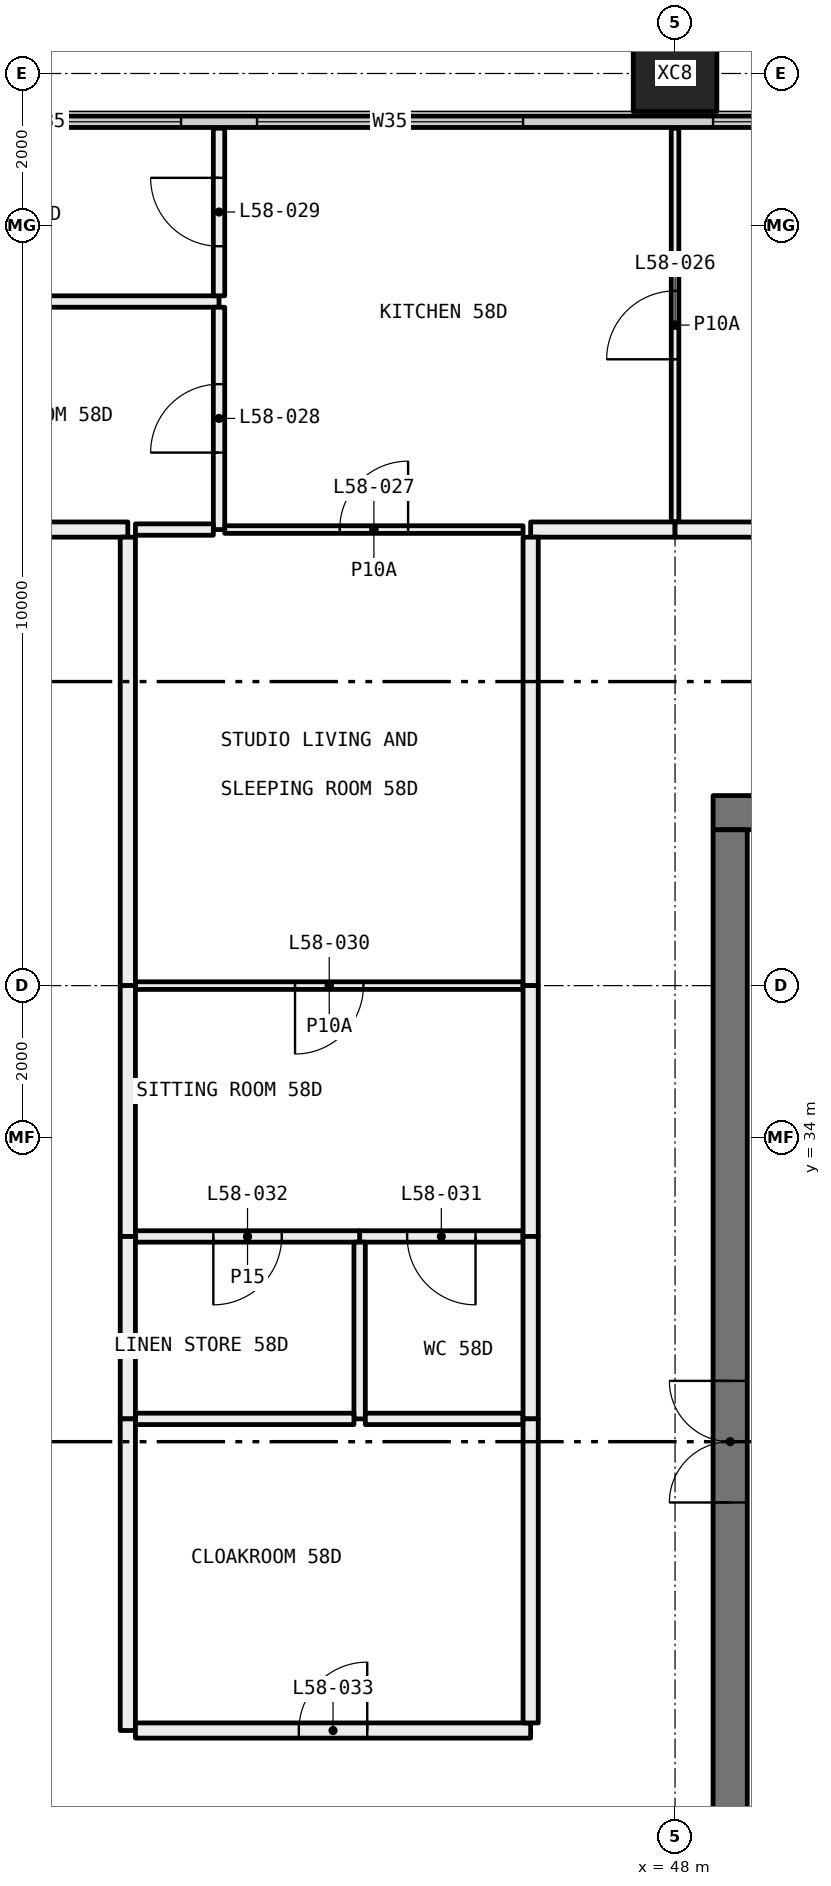
"""IFC4 building model, lengths in metres.
Left out: names, types, materials, properties, quantities, classifications, styles, units other than length and angle.
Written with IfcOpenShell. Run it as: python <this file> out.ifc"""

import sys

from ifc_helpers import new_model, si_unit, direction, frame, frame_2d, origin, origin_2d, place, context, subcontext, project, spatial, rectangle, hollow_rectangle, extrude, element, fill, save


model = new_model("IFC4")
c1 = context("Model", 3, precision=1e-05, world=origin(), true_north=direction((0.0, 1.0)))
c2 = subcontext(c1, "Body", "Model", "MODEL_VIEW")
j1 = project(units=[si_unit("LENGTHUNIT", "METRE"), si_unit("PLANEANGLEUNIT", "RADIAN")], contexts=[c1])
p1 = place(None, origin())
s1 = spatial("IfcSite", under=j1, at=p1, CompositionType="ELEMENT")
p2 = place(p1, origin())
s2 = spatial("IfcBuilding", under=s1, at=p2, CompositionType="ELEMENT")
p3 = place(p2, frame((0.0, 0.0, 217.95)))
s3 = spatial("IfcBuildingStorey", under=s2, at=p3, CompositionType="ELEMENT", Elevation=217.95)
p4 = place(p3, frame((48.0, 48.0, -0.4), z_axis=(0.0, 0.0, 1.0), x_axis=(1.0, 0.0, 0.0)))
e1 = element("IfcColumn", 1, at=p4, inside=s3, PredefinedType="COLUMN", context=c2, shape_type="SweptSolid", body=[
    extrude(hollow_rectangle(XDim=1.1, YDim=1.0, WallThickness=0.04, at=origin_2d()), origin(), (0.0, 0.0, 1.0), 3.45),
])
p5 = place(p3, frame((18.56, 47.365, 0.0), z_axis=(0.0, 0.0, 1.0), x_axis=(1.0, 0.0, 0.0)))
e2 = element("IfcWall", 2, at=p5, inside=s3, PredefinedType="ELEMENTEDWALL", context=c2, shape_type="SweptSolid", body=[
    extrude(rectangle(XDim=34.88, YDim=0.15, at=frame_2d((17.44, 0.0))), origin(), (0.0, 0.0, 1.0), 3.05),
])
p6 = place(p5, frame((0.44, 0.0, 0.45)))
e3 = element("IfcOpeningElement", 3, at=p6, cuts=e2, PredefinedType="OPENING", context=c2, shape_type="SweptSolid", body=[
    extrude(rectangle(XDim=4.5, YDim=2.55, at=frame_2d((2.25, 1.275))), frame((0.0, 0.085, 0.0), z_axis=(0.0, -1.0, 0.0), x_axis=(1.0, 0.0, 0.0)), (0.0, 0.0, 1.0), 0.17),
])
p7 = place(p5, frame((7.44, 0.0, 0.45)))
e4 = element("IfcOpeningElement", 4, at=p7, cuts=e2, PredefinedType="OPENING", context=c2, shape_type="SweptSolid", body=[
    extrude(rectangle(XDim=3.5, YDim=2.55, at=frame_2d((1.75, 1.275))), frame((0.0, 0.085, 0.0), z_axis=(0.0, -1.0, 0.0), x_axis=(1.0, 0.0, 0.0)), (0.0, 0.0, 1.0), 0.17),
])
p8 = place(p5, frame((11.94, 0.0, 0.45)))
e5 = element("IfcOpeningElement", 5, at=p8, cuts=e2, PredefinedType="OPENING", context=c2, shape_type="SweptSolid", body=[
    extrude(rectangle(XDim=2.0, YDim=2.55, at=frame_2d((1.0, 1.275))), frame((0.0, 0.085, 0.0), z_axis=(0.0, -1.0, 0.0), x_axis=(1.0, 0.0, 0.0)), (0.0, 0.0, 1.0), 0.17),
])
p9 = place(p5, frame((19.44, 0.0, 0.45)))
e6 = element("IfcOpeningElement", 6, at=p9, cuts=e2, PredefinedType="OPENING", context=c2, shape_type="SweptSolid", body=[
    extrude(rectangle(XDim=3.5, YDim=2.55, at=frame_2d((1.75, 1.275))), frame((0.0, 0.085, 0.0), z_axis=(0.0, -1.0, 0.0), x_axis=(1.0, 0.0, 0.0)), (0.0, 0.0, 1.0), 0.17),
])
p10 = place(p5, frame((23.94, 0.0, 0.45)))
e7 = element("IfcOpeningElement", 7, at=p10, cuts=e2, PredefinedType="OPENING", context=c2, shape_type="SweptSolid", body=[
    extrude(rectangle(XDim=3.5, YDim=2.55, at=frame_2d((1.75, 1.275))), frame((0.0, 0.085, 0.0), z_axis=(0.0, -1.0, 0.0), x_axis=(1.0, 0.0, 0.0)), (0.0, 0.0, 1.0), 0.17),
])
p11 = place(p5, frame((29.94, 0.0, 0.45)))
e8 = element("IfcOpeningElement", 8, at=p11, cuts=e2, PredefinedType="OPENING", context=c2, shape_type="SweptSolid", body=[
    extrude(rectangle(XDim=4.5, YDim=2.55, at=frame_2d((2.25, 1.275))), frame((0.0, 0.085, 0.0), z_axis=(0.0, -1.0, 0.0), x_axis=(1.0, 0.0, 0.0)), (0.0, 0.0, 1.0), 0.17),
])
p12 = place(p3, frame((42.0, 45.0, 0.0), z_axis=(0.0, 0.0, 1.0), x_axis=(-1.0, 0.0, 0.0)))
e9 = element("IfcWall", 9, at=p12, inside=s3, PredefinedType="PARTITIONING", context=c2, shape_type="SweptSolid", body=[
    extrude(rectangle(XDim=5.9, YDim=0.15, at=frame_2d((2.95, 0.0))), origin(), (0.0, 0.0, 1.0), 3.05),
])
p13 = place(p3, frame((42.0, 42.0, 0.0), z_axis=(0.0, 0.0, 1.0), x_axis=(0.0, 1.0, 0.0)))
e10 = element("IfcWall", 10, at=p13, inside=s3, PredefinedType="PARTITIONING", context=c2, shape_type="SweptSolid", body=[
    extrude(rectangle(XDim=2.925, YDim=0.15, at=frame_2d((1.462, 0.0))), origin(), (0.0, 0.0, 1.0), 3.05),
])
p14 = place(p13, frame((1.012, 0.0, 0.0)))
e11 = element("IfcOpeningElement", 11, at=p14, cuts=e10, PredefinedType="OPENING", context=c2, shape_type="SweptSolid", body=[
    extrude(rectangle(XDim=0.9, YDim=2.1, at=frame_2d((0.45, 1.05))), frame((0.0, 0.085, 0.0), z_axis=(0.0, -1.0, 0.0), x_axis=(1.0, 0.0, 0.0)), (0.0, 0.0, 1.0), 0.17),
])
p15 = place(p3, frame((40.9, 42.0, 0.0), z_axis=(0.0, 0.0, 1.0), x_axis=(1.0, 0.0, 0.0)))
e12 = element("IfcWall", 12, at=p15, inside=s3, PredefinedType="PARTITIONING", context=c2, shape_type="SweptSolid", body=[
    extrude(rectangle(XDim=1.025, YDim=0.15, at=frame_2d((0.513, 0.0))), origin(), (0.0, 0.0, 1.0), 3.05),
])
p16 = place(p3, frame((38.5, 42.0, 0.0), z_axis=(0.0, 0.0, 1.0), x_axis=(1.0, 0.0, 0.0)))
e13 = element("IfcWall", 13, at=p16, inside=s3, PredefinedType="PARTITIONING", context=c2, shape_type="SweptSolid", body=[
    extrude(rectangle(XDim=2.3, YDim=0.2, at=frame_2d((1.15, 0.0))), origin(), (0.0, 0.0, 1.0), 3.05),
])
p17 = place(p3, frame((42.0, 45.075, 0.0), z_axis=(0.0, 0.0, 1.0), x_axis=(0.0, 1.0, 0.0)))
e14 = element("IfcWall", 14, at=p17, inside=s3, PredefinedType="PARTITIONING", context=c2, shape_type="SweptSolid", body=[
    extrude(rectangle(XDim=2.205, YDim=0.15, at=frame_2d((1.103, 0.0))), origin(), (0.0, 0.0, 1.0), 3.05),
])
p18 = place(p17, frame((0.653, 0.0, 0.0)))
e15 = element("IfcOpeningElement", 15, at=p18, cuts=e14, PredefinedType="OPENING", context=c2, shape_type="SweptSolid", body=[
    extrude(rectangle(XDim=0.9, YDim=2.1, at=frame_2d((0.45, 1.05))), frame((0.0, 0.085, 0.0), z_axis=(0.0, -1.0, 0.0), x_axis=(1.0, 0.0, 0.0)), (0.0, 0.0, 1.0), 0.17),
])
p19 = place(p3, frame((48.0, 42.1, 0.0), z_axis=(0.0, 0.0, 1.0), x_axis=(0.0, 1.0, 0.0)))
e16 = element("IfcWall", 16, at=p19, inside=s3, PredefinedType="PARTITIONING", context=c2, shape_type="SweptSolid", body=[
    extrude(rectangle(XDim=5.18, YDim=0.1, at=frame_2d((2.59, 0.0))), origin(), (0.0, 0.0, 1.0), 3.05),
])
p20 = place(p19, frame((2.14, 0.0, 0.0)))
e17 = element("IfcOpeningElement", 17, at=p20, cuts=e16, PredefinedType="OPENING", context=c2, shape_type="SweptSolid", body=[
    extrude(rectangle(XDim=0.9, YDim=2.1, at=frame_2d((0.45, 1.05))), frame((0.0, 0.06, 0.0), z_axis=(0.0, -1.0, 0.0), x_axis=(1.0, 0.0, 0.0)), (0.0, 0.0, 1.0), 0.12),
])
p21 = place(p3, frame((42.075, 42.0, 0.0), z_axis=(0.0, 0.0, 1.0), x_axis=(1.0, 0.0, 0.0)))
e18 = element("IfcWall", 18, at=p21, inside=s3, PredefinedType="PARTITIONING", context=c2, shape_type="SweptSolid", body=[
    extrude(rectangle(XDim=3.925, YDim=0.1, at=frame_2d((1.962, 0.0))), origin(), (0.0, 0.0, 1.0), 3.05),
])
p22 = place(p21, frame((1.512, 0.0, 0.0)))
e19 = element("IfcOpeningElement", 19, at=p22, cuts=e18, PredefinedType="OPENING", context=c2, shape_type="SweptSolid", body=[
    extrude(rectangle(XDim=0.9, YDim=2.1, at=frame_2d((0.45, 1.05))), frame((0.0, 0.06, 0.0), z_axis=(0.0, -1.0, 0.0), x_axis=(1.0, 0.0, 0.0)), (0.0, 0.0, 1.0), 0.12),
])
p23 = place(p3, frame((46.1, 42.0, 0.0), z_axis=(0.0, 0.0, 1.0), x_axis=(1.0, 0.0, 0.0)))
e20 = element("IfcWall", 20, at=p23, inside=s3, PredefinedType="PARTITIONING", context=c2, shape_type="SweptSolid", body=[
    extrude(rectangle(XDim=1.9, YDim=0.2, at=frame_2d((0.95, 0.0))), origin(), (0.0, 0.0, 1.0), 3.05),
])
p24 = place(p3, frame((48.0, 42.0, 0.0), z_axis=(0.0, 0.0, 1.0), x_axis=(1.0, 0.0, 0.0)))
e21 = element("IfcWall", 21, at=p24, inside=s3, PredefinedType="PARTITIONING", context=c2, shape_type="SweptSolid", body=[
    extrude(rectangle(XDim=5.28, YDim=0.2, at=frame_2d((2.64, 0.0))), origin(), (0.0, 0.0, 1.0), 3.05),
])
p25 = place(p24, frame((2.14, 0.0, 0.0)))
e22 = element("IfcOpeningElement", 22, at=p25, cuts=e21, PredefinedType="OPENING", context=c2, shape_type="SweptSolid", body=[
    extrude(rectangle(XDim=1.0, YDim=2.1, at=frame_2d((0.5, 1.05))), frame((0.0, 0.11, 0.0), z_axis=(0.0, -1.0, 0.0), x_axis=(1.0, 0.0, 0.0)), (0.0, 0.0, 1.0), 0.22),
])
p26 = place(p3, frame((40.9, 36.0, 0.0), z_axis=(0.0, 0.0, 1.0), x_axis=(1.0, 0.0, 0.0)))
e23 = element("IfcWall", 23, at=p26, inside=s3, PredefinedType="PARTITIONING", context=c2, shape_type="SweptSolid", body=[
    extrude(rectangle(XDim=5.1, YDim=0.1, at=frame_2d((2.55, 0.0))), origin(), (0.0, 0.0, 1.0), 2.45),
])
p27 = place(p26, frame((2.1, 0.0, 0.0)))
e24 = element("IfcOpeningElement", 24, at=p27, cuts=e23, PredefinedType="OPENING", context=c2, shape_type="SweptSolid", body=[
    extrude(rectangle(XDim=0.9, YDim=2.1, at=frame_2d((0.45, 1.05))), frame((0.0, 0.06, 0.0), z_axis=(0.0, -1.0, 0.0), x_axis=(1.0, 0.0, 0.0)), (0.0, 0.0, 1.0), 0.12),
])
for number, where, z_axis, x_axis in (
    (25, (40.8, 41.9, 0.0), (0.0, 0.0, 1.0), (0.0, -1.0, 0.0)),
    (26, (46.1, 36.0, 0.0), (0.0, 0.0, 1.0), (0.0, 1.0, 0.0)),
):
    element("IfcWall", number, at=place(p3, frame(where, z_axis=z_axis, x_axis=x_axis)), inside=s3, PredefinedType="PARTITIONING", context=c2, shape_type="SweptSolid", body=[
        extrude(rectangle(XDim=5.9, YDim=0.2, at=frame_2d((2.95, 0.0))), origin(), (0.0, 0.0, 1.0), 2.45),
    ])
p28 = place(p3, frame((43.85, 32.7, 0.0), z_axis=(0.0, 0.0, 1.0), x_axis=(1.0, 0.0, 0.0)))
e27 = element("IfcWall", 27, at=p28, inside=s3, PredefinedType="PARTITIONING", context=c2, shape_type="SweptSolid", body=[
    extrude(rectangle(XDim=2.15, YDim=0.15, at=frame_2d((1.075, 0.0))), origin(), (0.0, 0.0, 1.0), 3.05),
])
p29 = place(p28, frame((0.625, 0.0, 0.0)))
e28 = element("IfcOpeningElement", 28, at=p29, cuts=e27, PredefinedType="OPENING", context=c2, shape_type="SweptSolid", body=[
    extrude(rectangle(XDim=0.9, YDim=2.1, at=frame_2d((0.45, 1.05))), frame((0.0, 0.085, 0.0), z_axis=(0.0, -1.0, 0.0), x_axis=(1.0, 0.0, 0.0)), (0.0, 0.0, 1.0), 0.17),
])
p30 = place(p3, frame((40.9, 32.7, 0.0), z_axis=(0.0, 0.0, 1.0), x_axis=(1.0, 0.0, 0.0)))
e29 = element("IfcWall", 29, at=p30, inside=s3, PredefinedType="PARTITIONING", context=c2, shape_type="SweptSolid", body=[
    extrude(rectangle(XDim=2.95, YDim=0.15, at=frame_2d((1.475, 0.0))), origin(), (0.0, 0.0, 1.0), 3.05),
])
p31 = place(p30, frame((1.025, 0.0, 0.0)))
e30 = element("IfcOpeningElement", 30, at=p31, cuts=e29, PredefinedType="OPENING", context=c2, shape_type="SweptSolid", body=[
    extrude(rectangle(XDim=0.9, YDim=2.1, at=frame_2d((0.45, 1.05))), frame((0.0, 0.085, 0.0), z_axis=(0.0, -1.0, 0.0), x_axis=(1.0, 0.0, 0.0)), (0.0, 0.0, 1.0), 0.17),
])
for number, where, z_axis, x_axis in (
    (31, (40.8, 36.0, 0.0), (0.0, 0.0, 1.0), (0.0, -1.0, 0.0)),
    (32, (46.1, 32.7, 0.0), (0.0, 0.0, 1.0), (0.0, 1.0, 0.0)),
):
    element("IfcWall", number, at=place(p3, frame(where, z_axis=z_axis, x_axis=x_axis)), inside=s3, PredefinedType="PARTITIONING", context=c2, shape_type="SweptSolid", body=[
        extrude(rectangle(XDim=3.3, YDim=0.2, at=frame_2d((1.65, 0.0))), origin(), (0.0, 0.0, 1.0), 2.45),
    ])
p32 = place(p3, frame((43.85, 32.625, 0.0), z_axis=(0.0, 0.0, 1.0), x_axis=(0.0, -1.0, 0.0)))
e33 = element("IfcWall", 33, at=p32, inside=s3, PredefinedType="PARTITIONING", context=c2, shape_type="SweptSolid", body=[
    extrude(rectangle(XDim=2.325, YDim=0.15, at=frame_2d((1.163, 0.0))), origin(), (0.0, 0.0, 1.0), 3.05),
])
p33 = place(p3, frame((43.925, 30.3, 0.0), z_axis=(0.0, 0.0, 1.0), x_axis=(1.0, 0.0, 0.0)))
e34 = element("IfcWall", 34, at=p33, inside=s3, PredefinedType="PARTITIONING", context=c2, shape_type="SweptSolid", body=[
    extrude(rectangle(XDim=2.075, YDim=0.15, at=frame_2d((1.038, 0.0))), origin(), (0.0, 0.0, 1.0), 3.05),
])
p34 = place(p3, frame((46.1, 30.3, 0.0), z_axis=(0.0, 0.0, 1.0), x_axis=(0.0, 1.0, 0.0)))
e35 = element("IfcWall", 35, at=p34, inside=s3, PredefinedType="PARTITIONING", context=c2, shape_type="SweptSolid", body=[
    extrude(rectangle(XDim=2.4, YDim=0.2, at=frame_2d((1.2, 0.0))), origin(), (0.0, 0.0, 1.0), 3.05),
])
p35 = place(p3, frame((40.9, 30.3, 0.0), z_axis=(0.0, 0.0, 1.0), x_axis=(1.0, 0.0, 0.0)))
e36 = element("IfcWall", 36, at=p35, inside=s3, PredefinedType="PARTITIONING", context=c2, shape_type="SweptSolid", body=[
    extrude(rectangle(XDim=2.875, YDim=0.15, at=frame_2d((1.438, 0.0))), origin(), (0.0, 0.0, 1.0), 3.05),
])
p36 = place(p3, frame((40.8, 32.7, 0.0), z_axis=(0.0, 0.0, 1.0), x_axis=(0.0, -1.0, 0.0)))
e37 = element("IfcWall", 37, at=p36, inside=s3, PredefinedType="PARTITIONING", context=c2, shape_type="SweptSolid", body=[
    extrude(rectangle(XDim=2.4, YDim=0.2, at=frame_2d((1.2, 0.0))), origin(), (0.0, 0.0, 1.0), 3.05),
])
p37 = place(p3, frame((40.8, 30.3, 0.0), z_axis=(0.0, 0.0, 1.0), x_axis=(0.0, -1.0, 0.0)))
e38 = element("IfcWall", 38, at=p37, inside=s3, PredefinedType="PARTITIONING", context=c2, shape_type="SweptSolid", body=[
    extrude(rectangle(XDim=4.1, YDim=0.2, at=frame_2d((2.05, 0.0))), origin(), (0.0, 0.0, 1.0), 3.05),
])
p38 = place(p3, frame((40.9, 26.2, 0.0), z_axis=(0.0, 0.0, 1.0), x_axis=(1.0, 0.0, 0.0)))
e39 = element("IfcWall", 39, at=p38, inside=s3, PredefinedType="PARTITIONING", context=c2, shape_type="SweptSolid", body=[
    extrude(rectangle(XDim=5.2, YDim=0.2, at=frame_2d((2.6, 0.0))), origin(), (0.0, 0.0, 1.0), 3.05),
])
p39 = place(p38, frame((2.15, 0.0, 0.0)))
e40 = element("IfcOpeningElement", 40, at=p39, cuts=e39, PredefinedType="OPENING", context=c2, shape_type="SweptSolid", body=[
    extrude(rectangle(XDim=0.9, YDim=2.1, at=frame_2d((0.45, 1.05))), frame((0.0, 0.11, 0.0), z_axis=(0.0, -1.0, 0.0), x_axis=(1.0, 0.0, 0.0)), (0.0, 0.0, 1.0), 0.22),
])
p40 = place(p3, frame((46.1, 26.3, 0.0), z_axis=(0.0, 0.0, 1.0), x_axis=(0.0, 1.0, 0.0)))
e41 = element("IfcWall", 41, at=p40, inside=s3, PredefinedType="PARTITIONING", context=c2, shape_type="SweptSolid", body=[
    extrude(rectangle(XDim=4.0, YDim=0.2, at=frame_2d((2.0, 0.0))), origin(), (0.0, 0.0, 1.0), 3.05),
])
p41 = place(p3, frame((59.5, 38.275, 0.0), z_axis=(0.0, 0.0, 1.0), x_axis=(-1.0, 0.0, 0.0)))
e42 = element("IfcWall", 42, at=p41, inside=s3, PredefinedType="SHEAR", context=c2, shape_type="SweptSolid", body=[
    extrude(rectangle(XDim=11.0, YDim=0.45, at=frame_2d((5.5, 0.0))), origin(), (0.0, 0.0, 1.0), 3.05),
])
p42 = place(p41, frame((8.575, 0.0, 0.0)))
e43 = element("IfcOpeningElement", 43, at=p42, cuts=e42, PredefinedType="OPENING", context=c2, shape_type="SweptSolid", body=[
    extrude(rectangle(XDim=1.6, YDim=2.1, at=frame_2d((0.8, 1.05))), frame((0.0, 0.235, 0.0), z_axis=(0.0, -1.0, 0.0), x_axis=(1.0, 0.0, 0.0)), (0.0, 0.0, 1.0), 0.47),
])
p43 = place(p3, frame((48.725, 21.95, 0.0), z_axis=(0.0, 0.0, 1.0), x_axis=(0.0, 1.0, 0.0)))
e44 = element("IfcWall", 44, at=p43, inside=s3, PredefinedType="SHEAR", context=c2, shape_type="SweptSolid", body=[
    extrude(rectangle(XDim=16.1, YDim=0.45, at=frame_2d((8.05, 0.0))), origin(), (0.0, 0.0, 1.0), 3.05),
])
p44 = place(p43, frame((7.25, 0.0, 0.0)))
e45 = element("IfcOpeningElement", 45, at=p44, cuts=e44, PredefinedType="OPENING", context=c2, shape_type="SweptSolid", body=[
    extrude(rectangle(XDim=1.6, YDim=2.1, at=frame_2d((0.8, 1.05))), frame((0.0, 0.235, 0.0), z_axis=(0.0, -1.0, 0.0), x_axis=(1.0, 0.0, 0.0)), (0.0, 0.0, 1.0), 0.47),
])
p45 = place(p9, origin())
e46 = element("IfcWindow", 46, at=p45, inside=s3, PartitioningType="SINGLE_PANEL", PredefinedType="WINDOW", context=c2, shape_type="SweptSolid", body=[
    extrude(rectangle(XDim=3.5, YDim=2.55, at=frame_2d((1.75, 1.275))), frame((0.0, 0.03, 0.0), z_axis=(0.0, -1.0, 0.0), x_axis=(1.0, 0.0, 0.0)), (0.0, 0.0, 1.0), 0.06),
])
fill(e6, e46)
p46 = place(p10, origin())
e47 = element("IfcWindow", 47, at=p46, inside=s3, PartitioningType="SINGLE_PANEL", PredefinedType="WINDOW", context=c2, shape_type="SweptSolid", body=[
    extrude(rectangle(XDim=3.5, YDim=2.55, at=frame_2d((1.75, 1.275))), frame((0.0, 0.03, 0.0), z_axis=(0.0, -1.0, 0.0), x_axis=(1.0, 0.0, 0.0)), (0.0, 0.0, 1.0), 0.06),
])
fill(e7, e47)
p47 = place(p11, origin())
e48 = element("IfcWindow", 48, at=p47, inside=s3, PartitioningType="SINGLE_PANEL", PredefinedType="WINDOW", context=c2, shape_type="SweptSolid", body=[
    extrude(rectangle(XDim=4.5, YDim=2.55, at=frame_2d((2.25, 1.275))), frame((0.0, 0.03, 0.0), z_axis=(0.0, -1.0, 0.0), x_axis=(1.0, 0.0, 0.0)), (0.0, 0.0, 1.0), 0.06),
])
fill(e8, e48)
p48 = place(p20, origin())
e49 = element("IfcDoor", 49, at=p48, inside=s3, OperationType="SINGLE_SWING_RIGHT", PredefinedType="DOOR", context=c2, shape_type="SweptSolid", body=[
    extrude(rectangle(XDim=0.9, YDim=2.1, at=frame_2d((0.45, 1.05))), frame((0.0, 0.025, 0.0), z_axis=(0.0, -1.0, 0.0), x_axis=(1.0, 0.0, 0.0)), (0.0, 0.0, 1.0), 0.05),
])
fill(e17, e49)
p49 = place(p22, origin())
e50 = element("IfcDoor", 50, at=p49, inside=s3, OperationType="SINGLE_SWING_LEFT", PredefinedType="DOOR", context=c2, shape_type="SweptSolid", body=[
    extrude(rectangle(XDim=0.9, YDim=2.1, at=frame_2d((0.45, 1.05))), frame((0.0, 0.025, 0.0), z_axis=(0.0, -1.0, 0.0), x_axis=(1.0, 0.0, 0.0)), (0.0, 0.0, 1.0), 0.05),
])
fill(e19, e50)
p50 = place(p14, origin())
e51 = element("IfcDoor", 51, at=p50, inside=s3, OperationType="SINGLE_SWING_RIGHT", PredefinedType="DOOR", context=c2, shape_type="SweptSolid", body=[
    extrude(rectangle(XDim=0.9, YDim=2.1, at=frame_2d((0.45, 1.05))), frame((0.0, 0.025, 0.0), z_axis=(0.0, -1.0, 0.0), x_axis=(1.0, 0.0, 0.0)), (0.0, 0.0, 1.0), 0.05),
])
fill(e11, e51)
p51 = place(p18, origin())
e52 = element("IfcDoor", 52, at=p51, inside=s3, OperationType="SINGLE_SWING_LEFT", PredefinedType="DOOR", context=c2, shape_type="SweptSolid", body=[
    extrude(rectangle(XDim=0.9, YDim=2.1, at=frame_2d((0.45, 1.05))), frame((0.0, 0.025, 0.0), z_axis=(0.0, -1.0, 0.0), x_axis=(1.0, 0.0, 0.0)), (0.0, 0.0, 1.0), 0.05),
])
fill(e15, e52)
p52 = place(p27, frame((0.9, 0.0, 0.0), x_axis=(-1.0, 0.0, 0.0)))
e53 = element("IfcDoor", 53, at=p52, inside=s3, OperationType="SINGLE_SWING_LEFT", PredefinedType="DOOR", context=c2, shape_type="SweptSolid", body=[
    extrude(rectangle(XDim=0.9, YDim=2.1, at=frame_2d((0.45, 1.05))), frame((0.0, 0.025, 0.0), z_axis=(0.0, -1.0, 0.0), x_axis=(1.0, 0.0, 0.0)), (0.0, 0.0, 1.0), 0.05),
])
fill(e24, e53)
p53 = place(p29, frame((0.9, 0.0, 0.0), x_axis=(-1.0, 0.0, 0.0)))
e54 = element("IfcDoor", 54, at=p53, inside=s3, OperationType="SINGLE_SWING_RIGHT", PredefinedType="DOOR", context=c2, shape_type="SweptSolid", body=[
    extrude(rectangle(XDim=0.9, YDim=2.1, at=frame_2d((0.45, 1.05))), frame((0.0, 0.025, 0.0), z_axis=(0.0, -1.0, 0.0), x_axis=(1.0, 0.0, 0.0)), (0.0, 0.0, 1.0), 0.05),
])
fill(e28, e54)
p54 = place(p31, frame((0.9, 0.0, 0.0), x_axis=(-1.0, 0.0, 0.0)))
e55 = element("IfcDoor", 55, at=p54, inside=s3, OperationType="SINGLE_SWING_LEFT", PredefinedType="DOOR", context=c2, shape_type="SweptSolid", body=[
    extrude(rectangle(XDim=0.9, YDim=2.1, at=frame_2d((0.45, 1.05))), frame((0.0, 0.025, 0.0), z_axis=(0.0, -1.0, 0.0), x_axis=(1.0, 0.0, 0.0)), (0.0, 0.0, 1.0), 0.05),
])
fill(e30, e55)
p55 = place(p39, origin())
e56 = element("IfcDoor", 56, at=p55, inside=s3, OperationType="SINGLE_SWING_LEFT", PredefinedType="DOOR", context=c2, shape_type="SweptSolid", body=[
    extrude(rectangle(XDim=0.9, YDim=2.1, at=frame_2d((0.45, 1.05))), frame((0.0, 0.025, 0.0), z_axis=(0.0, -1.0, 0.0), x_axis=(1.0, 0.0, 0.0)), (0.0, 0.0, 1.0), 0.05),
])
fill(e40, e56)
p56 = place(p44, origin())
e57 = element("IfcDoor", 57, at=p56, inside=s3, OperationType="DOUBLE_DOOR_SINGLE_SWING", PredefinedType="DOOR", context=c2, shape_type="SweptSolid", body=[
    extrude(rectangle(XDim=1.6, YDim=2.1, at=frame_2d((0.8, 1.05))), frame((0.0, 0.025, 0.0), z_axis=(0.0, -1.0, 0.0), x_axis=(1.0, 0.0, 0.0)), (0.0, 0.0, 1.0), 0.05),
])
fill(e45, e57)
save(model, sys.argv[1])
